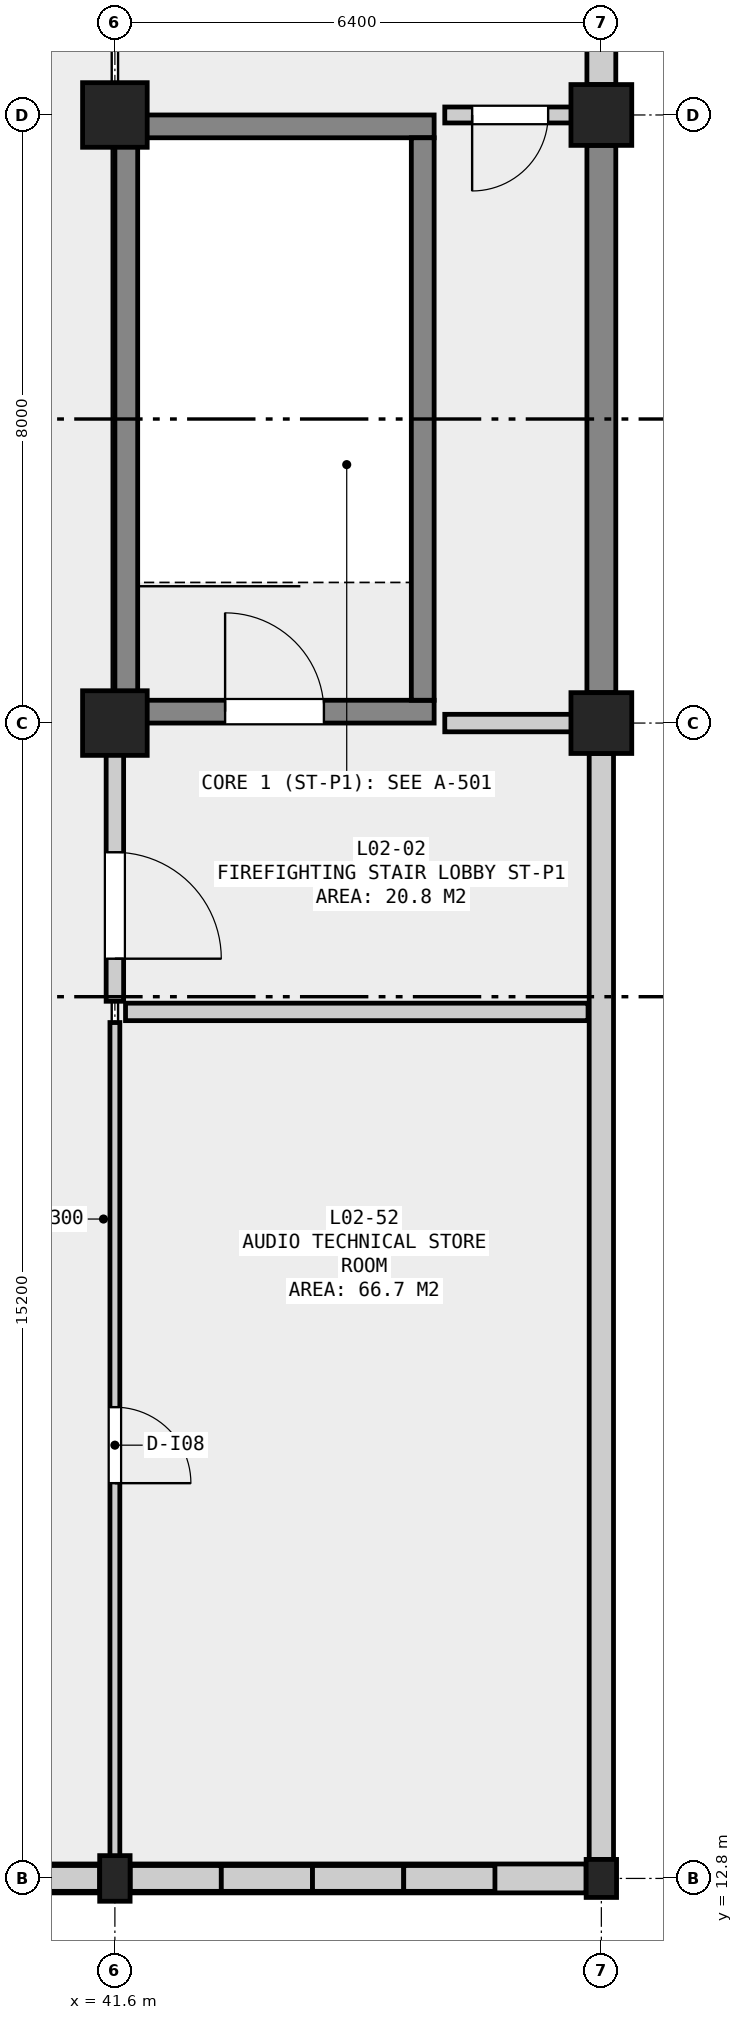
"""IFC4 building model, lengths in metres.
Left out: names, types, materials, properties, quantities, classifications, styles, units other than length and angle.
Written with IfcOpenShell. Run it as: python <this file> out.ifc"""

import sys

from ifc_helpers import new_model, si_unit, direction, frame, frame_2d, origin, origin_2d, place, context, subcontext, project, spatial, rectangle, extrude, element, fill, save


model = new_model("IFC4")
c1 = context("Model", 3, precision=1e-05, world=origin(), true_north=direction((0.0, 1.0)))
c2 = subcontext(c1, "Body", "Model", "MODEL_VIEW")
j1 = project(units=[si_unit("LENGTHUNIT", "METRE"), si_unit("PLANEANGLEUNIT", "RADIAN")], contexts=[c1])
p1 = place(None, origin())
s1 = spatial("IfcSite", under=j1, at=p1, CompositionType="ELEMENT")
p2 = place(p1, origin())
s2 = spatial("IfcBuilding", under=s1, at=p2, CompositionType="ELEMENT")
p3 = place(p2, frame((0.0, 0.0, 10.8)))
s3 = spatial("IfcBuildingStorey", under=s2, at=p3, CompositionType="ELEMENT", Elevation=10.8)
p4 = place(p3, frame((41.6, 12.8, 0.0), z_axis=(0.0, 0.0, 1.0), x_axis=(1.0, 0.0, 0.0)))
e1 = element("IfcColumn", 1, at=p4, inside=s3, PredefinedType="COLUMN", context=c2, shape_type="SweptSolid", body=[
    extrude(rectangle(XDim=0.4, YDim=0.6, at=origin_2d()), origin(), (0.0, 0.0, 1.0), 4.8),
])
for number, where, z_axis, x_axis in (
    (2, (41.6, 28.0, 0.0), (0.0, 0.0, 1.0), (1.0, 0.0, 0.0)),
    (3, (41.6, 36.0, 0.0), (0.0, 0.0, 1.0), (1.0, 0.0, 0.0)),
):
    element("IfcColumn", number, at=place(p3, frame(where, z_axis=z_axis, x_axis=x_axis)), inside=s3, PredefinedType="COLUMN", context=c2, shape_type="SweptSolid", body=[
        extrude(rectangle(XDim=0.85, YDim=0.85, at=origin_2d()), origin(), (0.0, 0.0, 1.0), 4.8),
    ])
p5 = place(p3, frame((48.0, 12.8, 0.0), z_axis=(0.0, 0.0, 1.0), x_axis=(1.0, 0.0, 0.0)))
e4 = element("IfcColumn", 4, at=p5, inside=s3, PredefinedType="COLUMN", context=c2, shape_type="SweptSolid", body=[
    extrude(rectangle(XDim=0.4, YDim=0.5, at=origin_2d()), origin(), (0.0, 0.0, 1.0), 4.8),
])
for number, where, z_axis, x_axis in (
    (5, (48.0, 28.0, 0.0), (0.0, 0.0, 1.0), (1.0, 0.0, 0.0)),
    (6, (48.0, 36.0, 0.0), (0.0, 0.0, 1.0), (1.0, 0.0, 0.0)),
):
    element("IfcColumn", number, at=place(p3, frame(where, z_axis=z_axis, x_axis=x_axis)), inside=s3, PredefinedType="COLUMN", context=c2, shape_type="SweptSolid", body=[
        extrude(rectangle(XDim=0.8, YDim=0.8, at=origin_2d()), origin(), (0.0, 0.0, 1.0), 4.8),
    ])
p6 = place(p3, frame((35.525, 12.8, 0.0), z_axis=(0.0, 0.0, 1.0), x_axis=(1.0, 0.0, 0.0)))
e7 = element("IfcWall", 7, at=p6, inside=s3, PredefinedType="SOLIDWALL", context=c2, shape_type="SweptSolid", body=[
    extrude(rectangle(XDim=5.875, YDim=0.38, at=frame_2d((2.938, 0.0))), origin(), (0.0, 0.0, 1.0), 3.89),
])
p7 = place(p6, frame((1.938, 0.0, 0.9)))
e8 = element("IfcOpeningElement", 8, at=p7, cuts=e7, PredefinedType="OPENING", context=c2, shape_type="SweptSolid", body=[
    extrude(rectangle(XDim=2.0, YDim=1.65, at=frame_2d((1.0, 0.825))), frame((0.0, 0.202, 0.0), z_axis=(0.0, -1.0, 0.0), x_axis=(1.0, 0.0, 0.0)), (0.0, 0.0, 1.0), 0.404),
])
p8 = place(p3, frame((41.8, 12.8, 0.0), z_axis=(0.0, 0.0, 1.0), x_axis=(1.0, 0.0, 0.0)))
e9 = element("IfcWall", 9, at=p8, inside=s3, PredefinedType="SOLIDWALL", context=c2, shape_type="SweptSolid", body=[
    extrude(rectangle(XDim=6.0, YDim=0.38, at=frame_2d((3.0, 0.0))), origin(), (0.0, 0.0, 1.0), 3.89),
])
p9 = place(p3, frame((48.0, 13.05, 0.0), z_axis=(0.0, 0.0, 1.0), x_axis=(0.0, 1.0, 0.0)))
e10 = element("IfcWall", 10, at=p9, inside=s3, PredefinedType="SOLIDWALL", context=c2, shape_type="SweptSolid", body=[
    extrude(rectangle(XDim=14.55, YDim=0.32, at=frame_2d((7.275, 0.0))), origin(), (0.0, 0.0, 1.0), 3.69),
])
p10 = place(p3, frame((48.0, 28.4, 0.0), z_axis=(0.0, 0.0, 1.0), x_axis=(0.0, 1.0, 0.0)))
e11 = element("IfcWall", 11, at=p10, inside=s3, PredefinedType="SOLIDWALL", context=c2, shape_type="SweptSolid", body=[
    extrude(rectangle(XDim=7.2, YDim=0.38, at=frame_2d((3.6, 0.0))), origin(), (0.0, 0.0, 1.0), 3.9),
])
p11 = place(p3, frame((48.0, 36.4, 0.0), z_axis=(0.0, 0.0, 1.0), x_axis=(0.0, 1.0, 0.0)))
e12 = element("IfcWall", 12, at=p11, inside=s3, PredefinedType="SOLIDWALL", context=c2, shape_type="SweptSolid", body=[
    extrude(rectangle(XDim=6.425, YDim=0.38, at=frame_2d((3.212, 0.0))), origin(), (0.0, 0.0, 1.0), 3.89),
])
p12 = place(p11, frame((1.462, 0.0, 0.9)))
e13 = element("IfcOpeningElement", 13, at=p12, cuts=e12, PredefinedType="OPENING", context=c2, shape_type="SweptSolid", body=[
    extrude(rectangle(XDim=1.8, YDim=2.1, at=frame_2d((0.9, 1.05))), frame((0.0, 0.202, 0.0), z_axis=(0.0, -1.0, 0.0), x_axis=(1.0, 0.0, 0.0)), (0.0, 0.0, 1.0), 0.404),
])
p13 = place(p3, frame((40.225, 12.8, 4.8), z_axis=(0.0, 0.0, 1.0), x_axis=(1.0, 0.0, 0.0)))
e14 = element("IfcWall", 14, at=p13, inside=s3, PredefinedType="SOLIDWALL", context=c2, shape_type="SweptSolid", body=[
    extrude(rectangle(XDim=1.175, YDim=0.34, at=frame_2d((0.587, 0.0))), origin(), (0.0, 0.0, 1.0), 1.253),
])
p14 = place(p3, frame((41.8, 12.8, 4.8), z_axis=(0.0, 0.0, 1.0), x_axis=(1.0, 0.0, 0.0)))
e15 = element("IfcWall", 15, at=p14, inside=s3, PredefinedType="SOLIDWALL", context=c2, shape_type="SweptSolid", body=[
    extrude(rectangle(XDim=1.2, YDim=0.34, at=frame_2d((0.6, 0.0))), origin(), (0.0, 0.0, 1.0), 1.247),
])
p15 = place(p3, frame((43.0, 12.8, 4.8), z_axis=(0.0, 0.0, 1.0), x_axis=(1.0, 0.0, 0.0)))
e16 = element("IfcWall", 16, at=p15, inside=s3, PredefinedType="SOLIDWALL", context=c2, shape_type="SweptSolid", body=[
    extrude(rectangle(XDim=1.2, YDim=0.34, at=frame_2d((0.6, 0.0))), origin(), (0.0, 0.0, 1.0), 0.947),
])
p16 = place(p3, frame((44.2, 12.8, 4.8), z_axis=(0.0, 0.0, 1.0), x_axis=(1.0, 0.0, 0.0)))
e17 = element("IfcWall", 17, at=p16, inside=s3, PredefinedType="SOLIDWALL", context=c2, shape_type="SweptSolid", body=[
    extrude(rectangle(XDim=1.2, YDim=0.34, at=frame_2d((0.6, 0.0))), origin(), (0.0, 0.0, 1.0), 0.648),
])
p17 = place(p3, frame((45.4, 12.8, 4.8), z_axis=(0.0, 0.0, 1.0), x_axis=(1.0, 0.0, 0.0)))
e18 = element("IfcWall", 18, at=p17, inside=s3, PredefinedType="SOLIDWALL", context=c2, shape_type="SweptSolid", body=[
    extrude(rectangle(XDim=1.2, YDim=0.34, at=frame_2d((0.6, 0.0))), origin(), (0.0, 0.0, 1.0), 0.349),
])
p18 = place(p3, frame((41.6, 28.15, 0.0), z_axis=(0.0, 0.0, 1.0), x_axis=(1.0, 0.0, 0.0)))
e19 = element("IfcWall", 19, at=p18, inside=s3, PredefinedType="SHEAR", context=c2, shape_type="SweptSolid", body=[
    extrude(rectangle(XDim=4.2, YDim=0.3, at=frame_2d((2.1, 0.0))), origin(), (0.0, 0.0, 1.0), 4.5),
])
p19 = place(p18, frame((1.45, 0.0, 0.0)))
e20 = element("IfcOpeningElement", 20, at=p19, cuts=e19, PredefinedType="OPENING", context=c2, shape_type="SweptSolid", body=[
    extrude(rectangle(XDim=1.3, YDim=2.18, at=frame_2d((0.65, 1.09))), frame((0.0, 0.162, 0.0), z_axis=(0.0, -1.0, 0.0), x_axis=(1.0, 0.0, 0.0)), (0.0, 0.0, 1.0), 0.324),
])
p20 = place(p3, frame((41.6, 35.85, 0.0), z_axis=(0.0, 0.0, 1.0), x_axis=(1.0, 0.0, 0.0)))
e21 = element("IfcWall", 21, at=p20, inside=s3, PredefinedType="SHEAR", context=c2, shape_type="SweptSolid", body=[
    extrude(rectangle(XDim=4.2, YDim=0.3, at=frame_2d((2.1, 0.0))), origin(), (0.0, 0.0, 1.0), 4.5),
])
for number, where, z_axis, x_axis in (
    (22, (41.75, 28.3, 0.0), (0.0, 0.0, 1.0), (0.0, 1.0, 0.0)),
    (23, (45.65, 28.3, 0.0), (0.0, 0.0, 1.0), (0.0, 1.0, 0.0)),
):
    element("IfcWall", number, at=place(p3, frame(where, z_axis=z_axis, x_axis=x_axis)), inside=s3, PredefinedType="SHEAR", context=c2, shape_type="SweptSolid", body=[
        extrude(rectangle(XDim=7.4, YDim=0.3, at=frame_2d((3.7, 0.0))), origin(), (0.0, 0.0, 1.0), 4.5),
    ])
p21 = place(p3, frame((41.74, 24.2, 0.0), z_axis=(0.0, 0.0, 1.0), x_axis=(1.0, 0.0, 0.0)))
e24 = element("IfcWall", 24, at=p21, inside=s3, PredefinedType="SOLIDWALL", context=c2, shape_type="SweptSolid", body=[
    extrude(rectangle(XDim=6.085, YDim=0.23, at=frame_2d((3.042, 0.0))), origin(), (0.0, 0.0, 1.0), 4.5),
])
p22 = place(p3, frame((45.94, 28.0, 0.0), z_axis=(0.0, 0.0, 1.0), x_axis=(1.0, 0.0, 0.0)))
e25 = element("IfcWall", 25, at=p22, inside=s3, PredefinedType="SOLIDWALL", context=c2, shape_type="SweptSolid", body=[
    extrude(rectangle(XDim=1.955, YDim=0.23, at=frame_2d((0.978, 0.0))), origin(), (0.0, 0.0, 1.0), 4.5),
])
p23 = place(p3, frame((41.6, 24.34, 0.0), z_axis=(0.0, 0.0, 1.0), x_axis=(0.0, 1.0, 0.0)))
e26 = element("IfcWall", 26, at=p23, inside=s3, PredefinedType="SOLIDWALL", context=c2, shape_type="SweptSolid", body=[
    extrude(rectangle(XDim=3.52, YDim=0.23, at=frame_2d((1.76, 0.0))), origin(), (0.0, 0.0, 1.0), 4.5),
])
p24 = place(p23, frame((0.56, 0.0, 0.0)))
e27 = element("IfcOpeningElement", 27, at=p24, cuts=e26, PredefinedType="OPENING", context=c2, shape_type="SweptSolid", body=[
    extrude(rectangle(XDim=1.4, YDim=2.2, at=frame_2d((0.7, 1.1))), frame((0.0, 0.127, 0.0), z_axis=(0.0, -1.0, 0.0), x_axis=(1.0, 0.0, 0.0)), (0.0, 0.0, 1.0), 0.254),
])
p25 = place(p3, frame((45.94, 36.0, 0.0), z_axis=(0.0, 0.0, 1.0), x_axis=(1.0, 0.0, 0.0)))
e28 = element("IfcWall", 28, at=p25, inside=s3, PredefinedType="SOLIDWALL", context=c2, shape_type="SweptSolid", body=[
    extrude(rectangle(XDim=1.955, YDim=0.21, at=frame_2d((0.978, 0.0))), origin(), (0.0, 0.0, 1.0), 4.5),
])
p26 = place(p25, frame((0.36, 0.0, 0.0)))
e29 = element("IfcOpeningElement", 29, at=p26, cuts=e28, PredefinedType="OPENING", context=c2, shape_type="SweptSolid", body=[
    extrude(rectangle(XDim=1.0, YDim=2.15, at=frame_2d((0.5, 1.075))), frame((0.0, 0.117, 0.0), z_axis=(0.0, -1.0, 0.0), x_axis=(1.0, 0.0, 0.0)), (0.0, 0.0, 1.0), 0.234),
])
p27 = place(p3, frame((41.6, 13.005, 0.0), z_axis=(0.0, 0.0, 1.0), x_axis=(0.0, 1.0, 0.0)))
e30 = element("IfcWall", 30, at=p27, inside=s3, PredefinedType="PARTITIONING", context=c2, shape_type="SweptSolid", body=[
    extrude(rectangle(XDim=11.055, YDim=0.13, at=frame_2d((5.528, 0.0))), origin(), (0.0, 0.0, 1.0), 4.5),
])
p28 = place(p27, frame((4.995, 0.0, 0.0)))
e31 = element("IfcOpeningElement", 31, at=p28, cuts=e30, PredefinedType="OPENING", context=c2, shape_type="SweptSolid", body=[
    extrude(rectangle(XDim=1.0, YDim=2.15, at=frame_2d((0.5, 1.075))), frame((0.0, 0.077, 0.0), z_axis=(0.0, -1.0, 0.0), x_axis=(1.0, 0.0, 0.0)), (0.0, 0.0, 1.0), 0.154),
])
p29 = place(p19, origin())
e32 = element("IfcDoor", 32, at=p29, inside=s3, OperationType="SINGLE_SWING_LEFT", PredefinedType="DOOR", context=c2, shape_type="SweptSolid", body=[
    extrude(rectangle(XDim=1.3, YDim=2.18, at=frame_2d((0.65, 1.09))), frame((0.0, 0.025, 0.0), z_axis=(0.0, -1.0, 0.0), x_axis=(1.0, 0.0, 0.0)), (0.0, 0.0, 1.0), 0.05),
])
fill(e20, e32)
p30 = place(p24, frame((1.4, 0.0, 0.0), z_axis=(0.0, 0.0, 1.0), x_axis=(-1.0, 0.0, 0.0)))
e33 = element("IfcDoor", 33, at=p30, inside=s3, OperationType="SINGLE_SWING_RIGHT", PredefinedType="DOOR", context=c2, shape_type="SweptSolid", body=[
    extrude(rectangle(XDim=1.4, YDim=2.2, at=frame_2d((0.7, 1.1))), frame((0.0, 0.025, 0.0), z_axis=(0.0, -1.0, 0.0), x_axis=(1.0, 0.0, 0.0)), (0.0, 0.0, 1.0), 0.05),
])
fill(e27, e33)
p31 = place(p26, frame((1.0, 0.0, 0.0), z_axis=(0.0, 0.0, 1.0), x_axis=(-1.0, 0.0, 0.0)))
e34 = element("IfcDoor", 34, at=p31, inside=s3, OperationType="SINGLE_SWING_RIGHT", PredefinedType="DOOR", context=c2, shape_type="SweptSolid", body=[
    extrude(rectangle(XDim=1.0, YDim=2.15, at=frame_2d((0.5, 1.075))), frame((0.0, 0.025, 0.0), z_axis=(0.0, -1.0, 0.0), x_axis=(1.0, 0.0, 0.0)), (0.0, 0.0, 1.0), 0.05),
])
fill(e29, e34)
p32 = place(p28, frame((1.0, 0.0, 0.0), z_axis=(0.0, 0.0, 1.0), x_axis=(-1.0, 0.0, 0.0)))
e35 = element("IfcDoor", 35, at=p32, inside=s3, OperationType="SINGLE_SWING_RIGHT", PredefinedType="DOOR", context=c2, shape_type="SweptSolid", body=[
    extrude(rectangle(XDim=1.0, YDim=2.15, at=frame_2d((0.5, 1.075))), frame((0.0, 0.025, 0.0), z_axis=(0.0, -1.0, 0.0), x_axis=(1.0, 0.0, 0.0)), (0.0, 0.0, 1.0), 0.05),
])
fill(e31, e35)
save(model, sys.argv[1])
